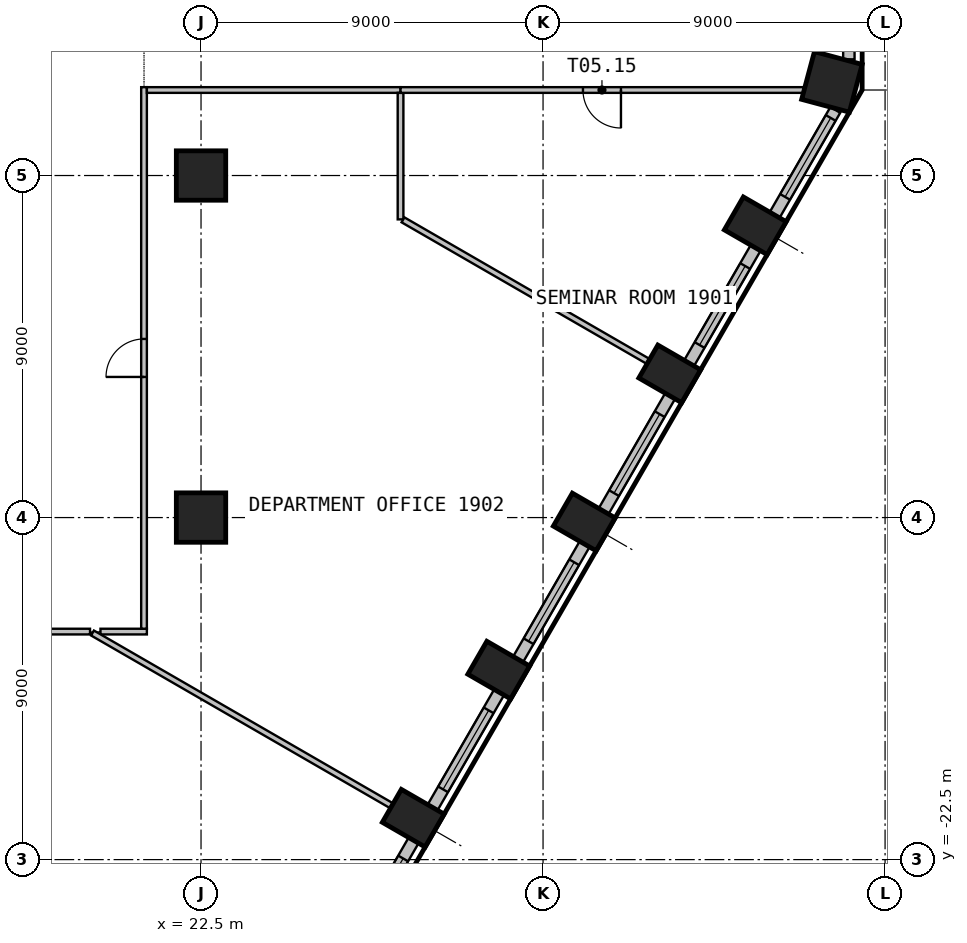
"""IFC4 building model, lengths in metres.
Left out: names, types, materials, properties, quantities, classifications, styles, units other than length and angle.
Written with IfcOpenShell. Run it as: python <this file> out.ifc"""

import sys

from ifc_helpers import new_model, si_unit, direction, frame, frame_2d, origin, origin_2d, place, context, subcontext, project, spatial, rectangle, circle, extrude, element, fill, save


model = new_model("IFC4")
c1 = context("Model", 3, precision=1e-05, world=origin(), true_north=direction((0.0, 1.0)))
c2 = subcontext(c1, "Body", "Model", "MODEL_VIEW")
j1 = project(units=[si_unit("LENGTHUNIT", "METRE"), si_unit("PLANEANGLEUNIT", "RADIAN")], contexts=[c1])
p1 = place(None, origin())
s1 = spatial("IfcSite", under=j1, at=p1, CompositionType="ELEMENT")
p2 = place(p1, origin())
s2 = spatial("IfcBuilding", under=s1, at=p2, CompositionType="ELEMENT")
p3 = place(p2, frame((0.0, 0.0, 81.3)))
s3 = spatial("IfcBuildingStorey", under=s2, at=p3, CompositionType="ELEMENT", Elevation=81.3)
for number, where, z_axis, x_axis in (
    (1, (28.084, -21.411, 0.0), (0.0, 0.0, 1.0), (0.5, 0.866, 0.0)),
    (2, (30.334, -17.513, 0.0), (0.0, 0.0, 1.0), (0.5, 0.866, 0.0)),
    (3, (32.584, -13.616, 0.0), (0.0, 0.0, 1.0), (0.5, 0.866, 0.0)),
    (4, (34.834, -9.719, 0.0), (0.0, 0.0, 1.0), (0.5, 0.866, 0.0)),
    (5, (37.084, -5.822, 0.0), (0.0, 0.0, 1.0), (0.5, 0.866, 0.0)),
):
    element("IfcColumn", number, at=place(p3, frame(where, z_axis=z_axis, x_axis=x_axis)), inside=s3, PredefinedType="COLUMN", context=c2, shape_type="SweptSolid", body=[
        extrude(rectangle(XDim=1.0, YDim=1.3, at=origin_2d()), origin(), (0.0, 0.0, 1.0), 3.525),
    ])
p4 = place(p3, frame((39.101, -2.037, 0.0), z_axis=(0.0, 0.0, 1.0), x_axis=(0.258819045103, 0.965925826289, 0.0)))
e6 = element("IfcColumn", 6, at=p4, inside=s3, PredefinedType="COLUMN", context=c2, shape_type="SweptSolid", body=[
    extrude(rectangle(XDim=1.3, YDim=1.3, at=origin_2d()), origin(), (0.0, 0.0, 1.0), 3.525),
])
for number, where, z_axis, x_axis in (
    (7, (22.5, -13.5, 0.0), (0.0, 0.0, 1.0), (1.0, 0.0, 0.0)),
    (8, (22.5, -4.5, 0.0), (0.0, 0.0, 1.0), (1.0, 0.0, 0.0)),
):
    element("IfcColumn", number, at=place(p3, frame(where, z_axis=z_axis, x_axis=x_axis)), inside=s3, PredefinedType="COLUMN", context=c2, shape_type="SweptSolid", body=[
        extrude(circle(Radius=0.65, at=origin_2d()), origin(), (0.0, 0.0, 1.0), 3.525),
    ])
p5 = place(p3, frame((26.344, -25.024, 0.0), z_axis=(0.0, 0.0, 1.0), x_axis=(0.499996256241, 0.866027565234, 0.0)))
e9 = element("IfcWall", 9, at=p5, inside=s3, PredefinedType="SOLIDWALL", context=c2, shape_type="SweptSolid", body=[
    extrude(rectangle(XDim=3.499, YDim=0.3, at=frame_2d((1.75, 0.0))), origin(), (0.0, 0.0, 1.0), 3.525),
])
p6 = place(p5, frame((0.55, 0.0, 0.9)))
e10 = element("IfcOpeningElement", 10, at=p6, cuts=e9, PredefinedType="OPENING", context=c2, shape_type="SweptSolid", body=[
    extrude(rectangle(XDim=2.4, YDim=2.1, at=frame_2d((1.2, 1.05))), frame((0.0, 0.16, 0.0), z_axis=(0.0, -1.0, 0.0), x_axis=(1.0, 0.0, 0.0)), (0.0, 0.0, 1.0), 0.32),
])
p7 = place(p3, frame((28.594, -21.127, 0.0), z_axis=(0.0, 0.0, 1.0), x_axis=(0.499996256241, 0.866027565234, 0.0)))
e11 = element("IfcWall", 11, at=p7, inside=s3, PredefinedType="SOLIDWALL", context=c2, shape_type="SweptSolid", body=[
    extrude(rectangle(XDim=3.499, YDim=0.3, at=frame_2d((1.75, 0.0))), origin(), (0.0, 0.0, 1.0), 3.525),
])
p8 = place(p7, frame((0.55, 0.0, 0.9)))
e12 = element("IfcOpeningElement", 12, at=p8, cuts=e11, PredefinedType="OPENING", context=c2, shape_type="SweptSolid", body=[
    extrude(rectangle(XDim=2.4, YDim=2.1, at=frame_2d((1.2, 1.05))), frame((0.0, 0.16, 0.0), z_axis=(0.0, -1.0, 0.0), x_axis=(1.0, 0.0, 0.0)), (0.0, 0.0, 1.0), 0.32),
])
p9 = place(p3, frame((30.844, -17.23, 0.0), z_axis=(0.0, 0.0, 1.0), x_axis=(0.499996256241, 0.866027565234, 0.0)))
e13 = element("IfcWall", 13, at=p9, inside=s3, PredefinedType="SOLIDWALL", context=c2, shape_type="SweptSolid", body=[
    extrude(rectangle(XDim=3.499, YDim=0.3, at=frame_2d((1.75, 0.0))), origin(), (0.0, 0.0, 1.0), 3.525),
])
p10 = place(p9, frame((0.55, 0.0, 0.9)))
e14 = element("IfcOpeningElement", 14, at=p10, cuts=e13, PredefinedType="OPENING", context=c2, shape_type="SweptSolid", body=[
    extrude(rectangle(XDim=2.4, YDim=2.1, at=frame_2d((1.2, 1.05))), frame((0.0, 0.16, 0.0), z_axis=(0.0, -1.0, 0.0), x_axis=(1.0, 0.0, 0.0)), (0.0, 0.0, 1.0), 0.32),
])
p11 = place(p3, frame((33.094, -13.333, 0.0), z_axis=(0.0, 0.0, 1.0), x_axis=(0.499996256241, 0.866027565234, 0.0)))
e15 = element("IfcWall", 15, at=p11, inside=s3, PredefinedType="SOLIDWALL", context=c2, shape_type="SweptSolid", body=[
    extrude(rectangle(XDim=3.499, YDim=0.3, at=frame_2d((1.75, 0.0))), origin(), (0.0, 0.0, 1.0), 3.525),
])
p12 = place(p11, frame((0.55, 0.0, 0.9)))
e16 = element("IfcOpeningElement", 16, at=p12, cuts=e15, PredefinedType="OPENING", context=c2, shape_type="SweptSolid", body=[
    extrude(rectangle(XDim=2.4, YDim=2.1, at=frame_2d((1.2, 1.05))), frame((0.0, 0.16, 0.0), z_axis=(0.0, -1.0, 0.0), x_axis=(1.0, 0.0, 0.0)), (0.0, 0.0, 1.0), 0.32),
])
p13 = place(p3, frame((35.344, -9.436, 0.0), z_axis=(0.0, 0.0, 1.0), x_axis=(0.499996256241, 0.866027565234, 0.0)))
e17 = element("IfcWall", 17, at=p13, inside=s3, PredefinedType="SOLIDWALL", context=c2, shape_type="SweptSolid", body=[
    extrude(rectangle(XDim=3.499, YDim=0.3, at=frame_2d((1.75, 0.0))), origin(), (0.0, 0.0, 1.0), 3.525),
])
p14 = place(p13, frame((0.55, 0.0, 0.9)))
e18 = element("IfcOpeningElement", 18, at=p14, cuts=e17, PredefinedType="OPENING", context=c2, shape_type="SweptSolid", body=[
    extrude(rectangle(XDim=2.4, YDim=2.1, at=frame_2d((1.2, 1.05))), frame((0.0, 0.16, 0.0), z_axis=(0.0, -1.0, 0.0), x_axis=(1.0, 0.0, 0.0)), (0.0, 0.0, 1.0), 0.32),
])
p15 = place(p3, frame((37.594, -5.539, 0.0), z_axis=(0.0, 0.0, 1.0), x_axis=(0.500004907028, 0.866022570692, 0.0)))
e19 = element("IfcWall", 19, at=p15, inside=s3, PredefinedType="SOLIDWALL", context=c2, shape_type="SweptSolid", body=[
    extrude(rectangle(XDim=3.192, YDim=0.3, at=frame_2d((1.596, 0.0))), origin(), (0.0, 0.0, 1.0), 3.525),
])
p16 = place(p15, frame((0.55, 0.0, 0.9)))
e20 = element("IfcOpeningElement", 20, at=p16, cuts=e19, PredefinedType="OPENING", context=c2, shape_type="SweptSolid", body=[
    extrude(rectangle(XDim=2.4, YDim=2.1, at=frame_2d((1.2, 1.05))), frame((0.0, 0.16, 0.0), z_axis=(0.0, -1.0, 0.0), x_axis=(1.0, 0.0, 0.0)), (0.0, 0.0, 1.0), 0.32),
])
p17 = place(p3, frame((39.547, -1.443, 0.0), z_axis=(0.0, 0.0, 1.0), x_axis=(0.0, 1.0, 0.0)))
e21 = element("IfcWall", 21, at=p17, inside=s3, PredefinedType="SOLIDWALL", context=c2, shape_type="SweptSolid", body=[
    extrude(rectangle(XDim=2.886, YDim=0.3, at=frame_2d((1.443, 0.0))), origin(), (0.0, 0.0, 1.0), 3.525),
])
p18 = place(p17, frame((0.243, 0.0, 0.9)))
e22 = element("IfcOpeningElement", 22, at=p18, cuts=e21, PredefinedType="OPENING", context=c2, shape_type="SweptSolid", body=[
    extrude(rectangle(XDim=2.4, YDim=2.1, at=frame_2d((1.2, 1.05))), frame((0.0, 0.16, 0.0), z_axis=(0.0, -1.0, 0.0), x_axis=(1.0, 0.0, 0.0)), (0.0, 0.0, 1.0), 0.32),
])
p19 = place(p3, frame((11.25, -16.5, 0.0), z_axis=(0.0, 0.0, 1.0), x_axis=(1.0, 0.0, 0.0)))
e23 = element("IfcWall", 23, at=p19, inside=s3, PredefinedType="PARTITIONING", context=c2, shape_type="SweptSolid", body=[
    extrude(rectangle(XDim=8.329, YDim=0.15, at=frame_2d((4.165, 0.0))), origin(), (0.0, 0.0, 1.0), 3.525),
])
p20 = place(p3, frame((19.854, -16.5, 0.0), z_axis=(0.0, 0.0, 1.0), x_axis=(1.0, 0.0, 0.0)))
e24 = element("IfcWall", 24, at=p20, inside=s3, PredefinedType="PARTITIONING", context=c2, shape_type="SweptSolid", body=[
    extrude(rectangle(XDim=1.221, YDim=0.15, at=frame_2d((0.61, 0.0))), origin(), (0.0, 0.0, 1.0), 3.525),
])
p21 = place(p3, frame((19.644, -16.538, 0.0), z_axis=(0.0, 0.0, 1.0), x_axis=(0.866004606565, -0.500036020111, 0.0)))
e25 = element("IfcWall", 25, at=p21, inside=s3, PredefinedType="PARTITIONING", context=c2, shape_type="SweptSolid", body=[
    extrude(rectangle(XDim=9.076, YDim=0.15, at=frame_2d((4.538, 0.0))), origin(), (0.0, 0.0, 1.0), 3.525),
])
p22 = place(p3, frame((21.0, -16.425, 0.0), z_axis=(0.0, 0.0, 1.0), x_axis=(0.0, 1.0, 0.0)))
e26 = element("IfcWall", 26, at=p22, inside=s3, PredefinedType="PARTITIONING", context=c2, shape_type="SweptSolid", body=[
    extrude(rectangle(XDim=14.25, YDim=0.15, at=frame_2d((7.125, 0.0))), origin(), (0.0, 0.0, 1.0), 3.525),
])
p23 = place(p22, frame((6.625, 0.0, 0.0)))
e27 = element("IfcOpeningElement", 27, at=p23, cuts=e26, PredefinedType="OPENING", context=c2, shape_type="SweptSolid", body=[
    extrude(rectangle(XDim=1.0, YDim=2.1, at=frame_2d((0.5, 1.05))), frame((0.0, 0.085, 0.0), z_axis=(0.0, -1.0, 0.0), x_axis=(1.0, 0.0, 0.0)), (0.0, 0.0, 1.0), 0.17),
])
p24 = place(p3, frame((27.75, -2.25, 0.0), z_axis=(0.0, 0.0, 1.0), x_axis=(-1.0, 0.0, 0.0)))
e28 = element("IfcWall", 28, at=p24, inside=s3, PredefinedType="PARTITIONING", context=c2, shape_type="SweptSolid", body=[
    extrude(rectangle(XDim=6.675, YDim=0.15, at=frame_2d((3.337, 0.0))), origin(), (0.0, 0.0, 1.0), 3.525),
])
p25 = place(p3, frame((27.75, -2.325, 0.0), z_axis=(0.0, 0.0, 1.0), x_axis=(0.0, -1.0, 0.0)))
e29 = element("IfcWall", 29, at=p25, inside=s3, PredefinedType="PARTITIONING", context=c2, shape_type="SweptSolid", body=[
    extrude(rectangle(XDim=3.329, YDim=0.15, at=frame_2d((1.665, 0.0))), origin(), (0.0, 0.0, 1.0), 3.525),
])
p26 = place(p3, frame((27.815, -5.667, 0.0), z_axis=(0.0, 0.0, 1.0), x_axis=(0.86601169699, -0.500023740114, 0.0)))
e30 = element("IfcWall", 30, at=p26, inside=s3, PredefinedType="PARTITIONING", context=c2, shape_type="SweptSolid", body=[
    extrude(rectangle(XDim=7.435, YDim=0.15, at=frame_2d((3.718, 0.0))), origin(), (0.0, 0.0, 1.0), 3.525),
])
p27 = place(p3, frame((38.35, -2.25, 0.0), z_axis=(0.0, 0.0, 1.0), x_axis=(-1.0, 0.0, 0.0)))
e31 = element("IfcWall", 31, at=p27, inside=s3, PredefinedType="PARTITIONING", context=c2, shape_type="SweptSolid", body=[
    extrude(rectangle(XDim=10.6, YDim=0.15, at=frame_2d((5.3, 0.0))), origin(), (0.0, 0.0, 1.0), 3.525),
])
p28 = place(p27, frame((4.8, 0.0, 0.0)))
e32 = element("IfcOpeningElement", 32, at=p28, cuts=e31, PredefinedType="OPENING", context=c2, shape_type="SweptSolid", body=[
    extrude(rectangle(XDim=1.0, YDim=2.1, at=frame_2d((0.5, 1.05))), frame((0.0, 0.085, 0.0), z_axis=(0.0, -1.0, 0.0), x_axis=(1.0, 0.0, 0.0)), (0.0, 0.0, 1.0), 0.17),
])
p29 = place(p6, origin())
e33 = element("IfcWindow", 33, at=p29, inside=s3, PartitioningType="SINGLE_PANEL", PredefinedType="WINDOW", context=c2, shape_type="SweptSolid", body=[
    extrude(rectangle(XDim=2.4, YDim=2.1, at=frame_2d((1.2, 1.05))), frame((0.0, 0.03, 0.0), z_axis=(0.0, -1.0, 0.0), x_axis=(1.0, 0.0, 0.0)), (0.0, 0.0, 1.0), 0.06),
])
fill(e10, e33)
p30 = place(p8, origin())
e34 = element("IfcWindow", 34, at=p30, inside=s3, PartitioningType="SINGLE_PANEL", PredefinedType="WINDOW", context=c2, shape_type="SweptSolid", body=[
    extrude(rectangle(XDim=2.4, YDim=2.1, at=frame_2d((1.2, 1.05))), frame((0.0, 0.03, 0.0), z_axis=(0.0, -1.0, 0.0), x_axis=(1.0, 0.0, 0.0)), (0.0, 0.0, 1.0), 0.06),
])
fill(e12, e34)
p31 = place(p10, origin())
e35 = element("IfcWindow", 35, at=p31, inside=s3, PartitioningType="SINGLE_PANEL", PredefinedType="WINDOW", context=c2, shape_type="SweptSolid", body=[
    extrude(rectangle(XDim=2.4, YDim=2.1, at=frame_2d((1.2, 1.05))), frame((0.0, 0.03, 0.0), z_axis=(0.0, -1.0, 0.0), x_axis=(1.0, 0.0, 0.0)), (0.0, 0.0, 1.0), 0.06),
])
fill(e14, e35)
p32 = place(p12, origin())
e36 = element("IfcWindow", 36, at=p32, inside=s3, PartitioningType="SINGLE_PANEL", PredefinedType="WINDOW", context=c2, shape_type="SweptSolid", body=[
    extrude(rectangle(XDim=2.4, YDim=2.1, at=frame_2d((1.2, 1.05))), frame((0.0, 0.03, 0.0), z_axis=(0.0, -1.0, 0.0), x_axis=(1.0, 0.0, 0.0)), (0.0, 0.0, 1.0), 0.06),
])
fill(e16, e36)
p33 = place(p14, origin())
e37 = element("IfcWindow", 37, at=p33, inside=s3, PartitioningType="SINGLE_PANEL", PredefinedType="WINDOW", context=c2, shape_type="SweptSolid", body=[
    extrude(rectangle(XDim=2.4, YDim=2.1, at=frame_2d((1.2, 1.05))), frame((0.0, 0.03, 0.0), z_axis=(0.0, -1.0, 0.0), x_axis=(1.0, 0.0, 0.0)), (0.0, 0.0, 1.0), 0.06),
])
fill(e18, e37)
p34 = place(p16, origin())
e38 = element("IfcWindow", 38, at=p34, inside=s3, PartitioningType="SINGLE_PANEL", PredefinedType="WINDOW", context=c2, shape_type="SweptSolid", body=[
    extrude(rectangle(XDim=2.4, YDim=2.1, at=frame_2d((1.2, 1.05))), frame((0.0, 0.03, 0.0), z_axis=(0.0, -1.0, 0.0), x_axis=(1.0, 0.0, 0.0)), (0.0, 0.0, 1.0), 0.06),
])
fill(e20, e38)
p35 = place(p23, origin())
e39 = element("IfcDoor", 39, at=p35, inside=s3, OperationType="SINGLE_SWING_RIGHT", PredefinedType="DOOR", context=c2, shape_type="SweptSolid", body=[
    extrude(rectangle(XDim=1.0, YDim=2.1, at=frame_2d((0.5, 1.05))), frame((0.0, 0.025, 0.0), z_axis=(0.0, -1.0, 0.0), x_axis=(1.0, 0.0, 0.0)), (0.0, 0.0, 1.0), 0.05),
])
fill(e27, e39)
p36 = place(p28, origin())
e40 = element("IfcDoor", 40, at=p36, inside=s3, OperationType="SINGLE_SWING_LEFT", PredefinedType="DOOR", context=c2, shape_type="SweptSolid", body=[
    extrude(rectangle(XDim=1.0, YDim=2.1, at=frame_2d((0.5, 1.05))), frame((0.0, 0.025, 0.0), z_axis=(0.0, -1.0, 0.0), x_axis=(1.0, 0.0, 0.0)), (0.0, 0.0, 1.0), 0.05),
])
fill(e32, e40)
save(model, sys.argv[1])
